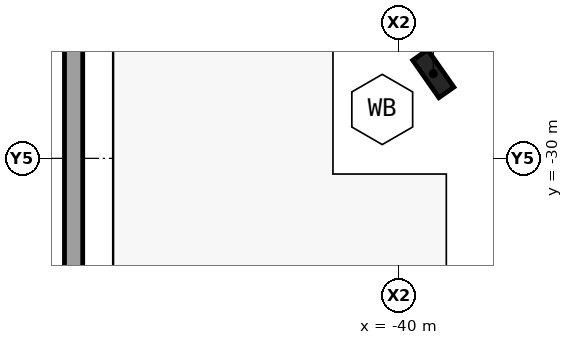
"""IFC4 building model, lengths in metres.
Left out: names, types, materials, properties, quantities, classifications, styles, units other than length and angle.
Written with IfcOpenShell. Run it as: python <this file> out.ifc"""

import sys

from ifc_helpers import new_model, si_unit, direction, frame, origin, origin_2d, place, context, subcontext, project, spatial, polyline, rectangle, outline, extrude, element, save


model = new_model("IFC4")
c1 = context("Model", 3, precision=1e-05, world=origin(), true_north=direction((0.0, 1.0)))
c2 = subcontext(c1, "Body", "Model", "MODEL_VIEW")
j1 = project(units=[si_unit("LENGTHUNIT", "METRE"), si_unit("PLANEANGLEUNIT", "RADIAN")], contexts=[c1])
p1 = place(None, origin())
s1 = spatial("IfcSite", under=j1, at=p1, CompositionType="ELEMENT")
p2 = place(p1, origin())
s2 = spatial("IfcBuilding", under=s1, at=p2, CompositionType="ELEMENT")
p3 = place(p2, frame((0.0, 0.0, -9.0)))
s3 = spatial("IfcBuildingStorey", under=s2, at=p3, CompositionType="ELEMENT", Elevation=-9.0)
p4 = place(p3, frame((-50.7, -1.0, 0.0), z_axis=(0.0, 0.0, 1.0), x_axis=(0.0, -1.0, 0.0)))
e1 = element("IfcWall", 1, at=p4, inside=s3, PredefinedType="SOLIDWALL", context=c2, shape_type="SweptSolid", body=[
    extrude(outline(polyline([(81.4, 0.3), (81.4, -0.3), (0.6, -0.3), (0.6, 0.3), (81.4, 0.3)])), origin(), (0.0, 0.0, 1.0), 4.5),
])
p5 = place(p3, frame((-38.869, -27.216, 0.0), z_axis=(0.0, 0.0, 1.0), x_axis=(-0.573576436351, 0.819152044289, 0.0)))
e2 = element("IfcColumn", 2, at=p5, inside=s3, PredefinedType="COLUMN", context=c2, shape_type="SweptSolid", body=[
    extrude(rectangle(XDim=1.5, YDim=0.6, at=origin_2d()), origin(), (0.0, 0.0, 1.0), 4.5),
])
save(model, sys.argv[1])
